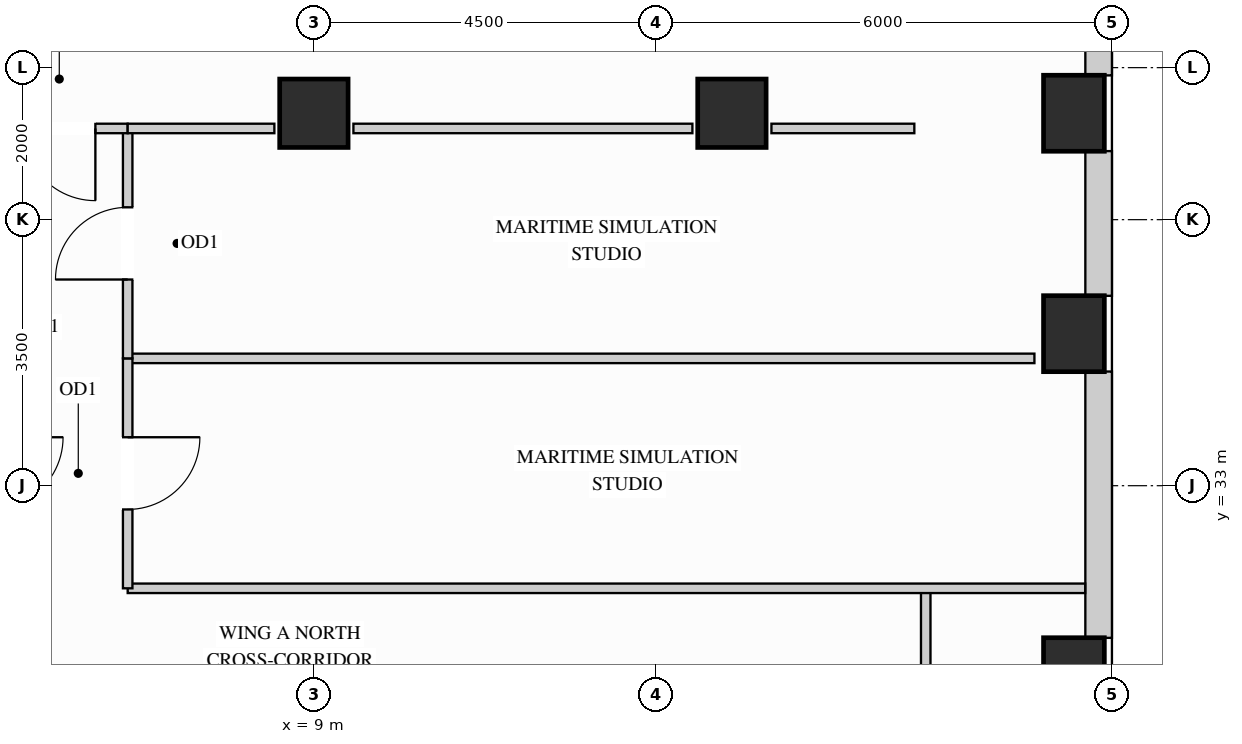
"""IFC4 building model, lengths in metres.
Left out: names, types, materials, properties, quantities, classifications, styles, units other than length and angle.
Written with IfcOpenShell. Run it as: python <this file> out.ifc"""

import sys

from ifc_helpers import new_model, si_unit, direction, frame, frame_2d, origin, origin_2d, place, context, subcontext, project, spatial, rectangle, extrude, source, transform, mapped, element, fill, save


model = new_model("IFC4")
c1 = context("Model", 3, precision=1e-05, world=origin(), true_north=direction((0.0, 1.0)))
c2 = subcontext(c1, "Body", "Model", "MODEL_VIEW")
j1 = project(units=[si_unit("LENGTHUNIT", "METRE"), si_unit("PLANEANGLEUNIT", "RADIAN")], contexts=[c1])
p1 = place(None, origin())
s1 = spatial("IfcSite", under=j1, at=p1, CompositionType="ELEMENT")
p2 = place(p1, origin())
s2 = spatial("IfcBuilding", under=s1, at=p2, CompositionType="ELEMENT")
p3 = place(p2, frame((0.0, 0.0, 143.1)))
s3 = spatial("IfcBuildingStorey", under=s2, at=p3, CompositionType="ELEMENT", Elevation=143.1)
m1 = source(origin(), c2, "Body", "SweptSolid", [
    extrude(rectangle(XDim=0.9, YDim=0.9, at=origin_2d()), origin(), (0.0, 0.0, 1.0), 3.4),
])
for number, where, z_axis, x_axis in (
    (1, (14.5, 37.9, 0.0), (0.0, 0.0, 1.0), (1.0, 0.0, 0.0)),
    (2, (9.0, 37.9, 0.0), (0.0, 0.0, 1.0), (1.0, 0.0, 0.0)),
):
    element("IfcColumn", number, at=place(p3, frame(where, z_axis=z_axis, x_axis=x_axis)), inside=s3, PredefinedType="COLUMN", context=c2, shape_type="MappedRepresentation", body=[
        mapped(m1, transform((0.0, 0.0, 0.0), x_axis=(1.0, 0.0, 0.0), y_axis=(0.0, 1.0, 0.0), z_axis=(0.0, 0.0, 1.0))),
    ])
m2 = source(origin(), c2, "Body", "SweptSolid", [
    extrude(rectangle(XDim=0.8, YDim=1.0, at=origin_2d()), origin(), (0.0, 0.0, 1.0), 3.4),
])
for number, where, z_axis, x_axis in (
    (3, (19.0, 30.5, 0.0), (0.0, 0.0, 1.0), (1.0, 0.0, 0.0)),
    (4, (19.0, 35.0, 0.0), (0.0, 0.0, 1.0), (1.0, 0.0, 0.0)),
    (5, (19.0, 37.9, 0.0), (0.0, 0.0, 1.0), (1.0, 0.0, 0.0)),
):
    element("IfcColumn", number, at=place(p3, frame(where, z_axis=z_axis, x_axis=x_axis)), inside=s3, PredefinedType="COLUMN", context=c2, shape_type="MappedRepresentation", body=[
        mapped(m2, transform((0.0, 0.0, 0.0), x_axis=(1.0, 0.0, 0.0), y_axis=(0.0, 1.0, 0.0), z_axis=(0.0, 0.0, 1.0))),
    ])
m3 = source(origin(), c2, "Body", "SweptSolid", [
    extrude(rectangle(XDim=3.504, YDim=0.35, at=frame_2d((1.752, 0.0))), origin(), (0.0, 0.0, 1.0), 2.612),
])
p4 = place(p3, frame((19.325, 30.998, 0.0), z_axis=(0.0, 0.0, 1.0), x_axis=(0.0, 1.0, 0.0)))
e6 = element("IfcWall", 6, at=p4, inside=s3, PredefinedType="SOLIDWALL", context=c2, shape_type="MappedRepresentation", body=[
    mapped(m3, transform((0.0, 0.0, 0.0), x_axis=(1.0, 0.0, 0.0), y_axis=(0.0, 1.0, 0.0), z_axis=(0.0, 0.0, 1.0))),
])
m4 = source(origin(), c2, "Body", "SweptSolid", [
    extrude(rectangle(XDim=1.904, YDim=0.35, at=frame_2d((0.952, 0.0))), origin(), (0.0, 0.0, 1.0), 2.612),
])
p5 = place(p3, frame((19.325, 35.498, 0.0), z_axis=(0.0, 0.0, 1.0), x_axis=(0.0, 1.0, 0.0)))
e7 = element("IfcWall", 7, at=p5, inside=s3, PredefinedType="SOLIDWALL", context=c2, shape_type="MappedRepresentation", body=[
    mapped(m4, transform((0.0, 0.0, 0.0), x_axis=(1.0, 0.0, 0.0), y_axis=(0.0, 1.0, 0.0), z_axis=(0.0, 0.0, 1.0))),
])
m5 = source(origin(), c2, "Body", "SweptSolid", [
    extrude(rectangle(XDim=0.754, YDim=0.35, at=frame_2d((0.377, 0.0))), origin(), (0.0, 0.0, 1.0), 3.385),
])
p6 = place(p3, frame((19.325, 38.398, 0.0), z_axis=(0.0, 0.0, 1.0), x_axis=(0.0, 1.0, 0.0)))
e8 = element("IfcWall", 8, at=p6, inside=s3, PredefinedType="SOLIDWALL", context=c2, shape_type="MappedRepresentation", body=[
    mapped(m5, transform((0.0, 0.0, 0.0), x_axis=(1.0, 0.0, 0.0), y_axis=(0.0, 1.0, 0.0), z_axis=(0.0, 0.0, 1.0))),
])
p7 = place(p3, frame((17.05, 26.05, 0.0), z_axis=(0.0, 0.0, 1.0), x_axis=(0.0, 1.0, 0.0)))
e9 = element("IfcWall", 9, at=p7, inside=s3, PredefinedType="PARTITIONING", context=c2, shape_type="SweptSolid", body=[
    extrude(rectangle(XDim=5.6, YDim=0.125, at=frame_2d((2.8, 0.0))), origin(), (0.0, 0.0, 1.0), 3.385),
])
p8 = place(p7, frame((2.325, 0.0, 0.0)))
e10 = element("IfcOpeningElement", 10, at=p8, cuts=e9, PredefinedType="OPENING", context=c2, shape_type="SweptSolid", body=[
    extrude(rectangle(XDim=0.95, YDim=2.15, at=frame_2d((0.475, 1.075))), frame((0.0, 0.073, 0.0), z_axis=(0.0, -1.0, 0.0), x_axis=(1.0, 0.0, 0.0)), (0.0, 0.0, 1.0), 0.145),
])
m6 = source(origin(), c2, "Body", "SweptSolid", [
    extrude(rectangle(XDim=11.93, YDim=0.125, at=frame_2d((5.965, 0.0))), origin(), (0.0, 0.0, 1.0), 3.385),
])
p9 = place(p3, frame((6.55, 34.675, 0.0), z_axis=(0.0, 0.0, 1.0), x_axis=(1.0, 0.0, 0.0)))
e11 = element("IfcWall", 11, at=p9, inside=s3, PredefinedType="PARTITIONING", context=c2, shape_type="MappedRepresentation", body=[
    mapped(m6, transform((0.0, 0.0, 0.0), x_axis=(1.0, 0.0, 0.0), y_axis=(0.0, 1.0, 0.0), z_axis=(0.0, 0.0, 1.0))),
])
m7 = source(origin(), c2, "Body", "SweptSolid", [
    extrude(rectangle(XDim=12.598, YDim=0.125, at=frame_2d((6.299, 0.0))), origin(), (0.0, 0.0, 1.0), 2.848),
])
p10 = place(p3, frame((6.55, 31.65, 0.0), z_axis=(0.0, 0.0, 1.0), x_axis=(1.0, 0.0, 0.0)))
e12 = element("IfcWall", 12, at=p10, inside=s3, PredefinedType="PARTITIONING", context=c2, shape_type="MappedRepresentation", body=[
    mapped(m7, transform((0.0, 0.0, 0.0), x_axis=(1.0, 0.0, 0.0), y_axis=(0.0, 1.0, 0.0), z_axis=(0.0, 0.0, 1.0))),
])
p11 = place(p3, frame((6.55, 31.65, 0.0), z_axis=(0.0, 0.0, 1.0), x_axis=(0.0, 1.0, 0.0)))
e13 = element("IfcWall", 13, at=p11, inside=s3, PredefinedType="PARTITIONING", context=c2, shape_type="SweptSolid", body=[
    extrude(rectangle(XDim=3.025, YDim=0.125, at=frame_2d((1.513, 0.0))), origin(), (0.0, 0.0, 1.0), 3.385),
])
p12 = place(p11, frame((1.038, 0.0, 0.0)))
e14 = element("IfcOpeningElement", 14, at=p12, cuts=e13, PredefinedType="OPENING", context=c2, shape_type="SweptSolid", body=[
    extrude(rectangle(XDim=0.95, YDim=2.15, at=frame_2d((0.475, 1.075))), frame((0.0, 0.073, 0.0), z_axis=(0.0, -1.0, 0.0), x_axis=(1.0, 0.0, 0.0)), (0.0, 0.0, 1.0), 0.145),
])
p13 = place(p3, frame((6.55, 34.675, 0.0), z_axis=(0.0, 0.0, 1.0), x_axis=(0.0, 1.0, 0.0)))
e15 = element("IfcWall", 15, at=p13, inside=s3, PredefinedType="PARTITIONING", context=c2, shape_type="SweptSolid", body=[
    extrude(rectangle(XDim=3.025, YDim=0.125, at=frame_2d((1.512, 0.0))), origin(), (0.0, 0.0, 1.0), 3.385),
])
p14 = place(p13, frame((1.038, 0.0, 0.0)))
e16 = element("IfcOpeningElement", 16, at=p14, cuts=e15, PredefinedType="OPENING", context=c2, shape_type="SweptSolid", body=[
    extrude(rectangle(XDim=0.95, YDim=2.15, at=frame_2d((0.475, 1.075))), frame((0.0, 0.073, 0.0), z_axis=(0.0, -1.0, 0.0), x_axis=(1.0, 0.0, 0.0)), (0.0, 0.0, 1.0), 0.145),
])
p15 = place(p3, frame((4.75, 37.7, 0.0), z_axis=(0.0, 0.0, 1.0), x_axis=(1.0, 0.0, 0.0)))
e17 = element("IfcWall", 17, at=p15, inside=s3, PredefinedType="PARTITIONING", context=c2, shape_type="SweptSolid", body=[
    extrude(rectangle(XDim=1.8, YDim=0.125, at=frame_2d((0.9, 0.0))), origin(), (0.0, 0.0, 1.0), 2.773),
])
p16 = place(p15, frame((0.425, 0.0, 0.0)))
e18 = element("IfcOpeningElement", 18, at=p16, cuts=e17, PredefinedType="OPENING", context=c2, shape_type="SweptSolid", body=[
    extrude(rectangle(XDim=0.95, YDim=2.15, at=frame_2d((0.475, 1.075))), frame((0.0, 0.073, 0.0), z_axis=(0.0, -1.0, 0.0), x_axis=(1.0, 0.0, 0.0)), (0.0, 0.0, 1.0), 0.145),
])
m8 = source(origin(), c2, "Body", "SweptSolid", [
    extrude(rectangle(XDim=1.93, YDim=0.125, at=frame_2d((0.965, 0.0))), origin(), (0.0, 0.0, 1.0), 2.773),
])
p17 = place(p3, frame((6.55, 37.7, 0.0), z_axis=(0.0, 0.0, 1.0), x_axis=(1.0, 0.0, 0.0)))
e19 = element("IfcWall", 19, at=p17, inside=s3, PredefinedType="PARTITIONING", context=c2, shape_type="MappedRepresentation", body=[
    mapped(m8, transform((0.0, 0.0, 0.0), x_axis=(1.0, 0.0, 0.0), y_axis=(0.0, 1.0, 0.0), z_axis=(0.0, 0.0, 1.0))),
])
m9 = source(origin(), c2, "Body", "SweptSolid", [
    extrude(rectangle(XDim=4.46, YDim=0.125, at=frame_2d((2.23, 0.0))), origin(), (0.0, 0.0, 1.0), 2.773),
])
p18 = place(p3, frame((9.52, 37.7, 0.0), z_axis=(0.0, 0.0, 1.0), x_axis=(1.0, 0.0, 0.0)))
e20 = element("IfcWall", 20, at=p18, inside=s3, PredefinedType="PARTITIONING", context=c2, shape_type="MappedRepresentation", body=[
    mapped(m9, transform((0.0, 0.0, 0.0), x_axis=(1.0, 0.0, 0.0), y_axis=(0.0, 1.0, 0.0), z_axis=(0.0, 0.0, 1.0))),
])
m10 = source(origin(), c2, "Body", "SweptSolid", [
    extrude(rectangle(XDim=1.88, YDim=0.125, at=frame_2d((0.94, 0.0))), origin(), (0.0, 0.0, 1.0), 2.773),
])
p19 = place(p3, frame((15.02, 37.7, 0.0), z_axis=(0.0, 0.0, 1.0), x_axis=(1.0, 0.0, 0.0)))
e21 = element("IfcWall", 21, at=p19, inside=s3, PredefinedType="PARTITIONING", context=c2, shape_type="MappedRepresentation", body=[
    mapped(m10, transform((0.0, 0.0, 0.0), x_axis=(1.0, 0.0, 0.0), y_axis=(0.0, 1.0, 0.0), z_axis=(0.0, 0.0, 1.0))),
])
m11 = source(origin(), c2, "Body", "SweptSolid", [
    extrude(rectangle(XDim=0.95, YDim=2.15, at=frame_2d((0.475, 1.075))), frame((0.0, 0.025, 0.0), z_axis=(0.0, -1.0, 0.0), x_axis=(1.0, 0.0, 0.0)), (0.0, 0.0, 1.0), 0.05),
])
p20 = place(p12, origin())
e22 = element("IfcDoor", 22, at=p20, inside=s3, OperationType="SINGLE_SWING_RIGHT", PredefinedType="DOOR", context=c2, shape_type="MappedRepresentation", body=[
    mapped(m11, transform((0.0, 0.0, 0.0), x_axis=(1.0, 0.0, 0.0), y_axis=(0.0, 1.0, 0.0), z_axis=(0.0, 0.0, 1.0))),
])
fill(e14, e22)
p21 = place(p14, origin())
e23 = element("IfcDoor", 23, at=p21, inside=s3, OperationType="SINGLE_SWING_LEFT", PredefinedType="DOOR", context=c2, shape_type="MappedRepresentation", body=[
    mapped(m11, transform((0.0, 0.0, 0.0), x_axis=(1.0, 0.0, 0.0), y_axis=(0.0, 1.0, 0.0), z_axis=(0.0, 0.0, 1.0))),
])
fill(e16, e23)
p22 = place(p16, origin())
e24 = element("IfcDoor", 24, at=p22, inside=s3, OperationType="SINGLE_SWING_RIGHT", PredefinedType="DOOR", context=c2, shape_type="MappedRepresentation", body=[
    mapped(m11, transform((0.0, 0.0, 0.0), x_axis=(1.0, 0.0, 0.0), y_axis=(0.0, 1.0, 0.0), z_axis=(0.0, 0.0, 1.0))),
])
fill(e18, e24)
save(model, sys.argv[1])
